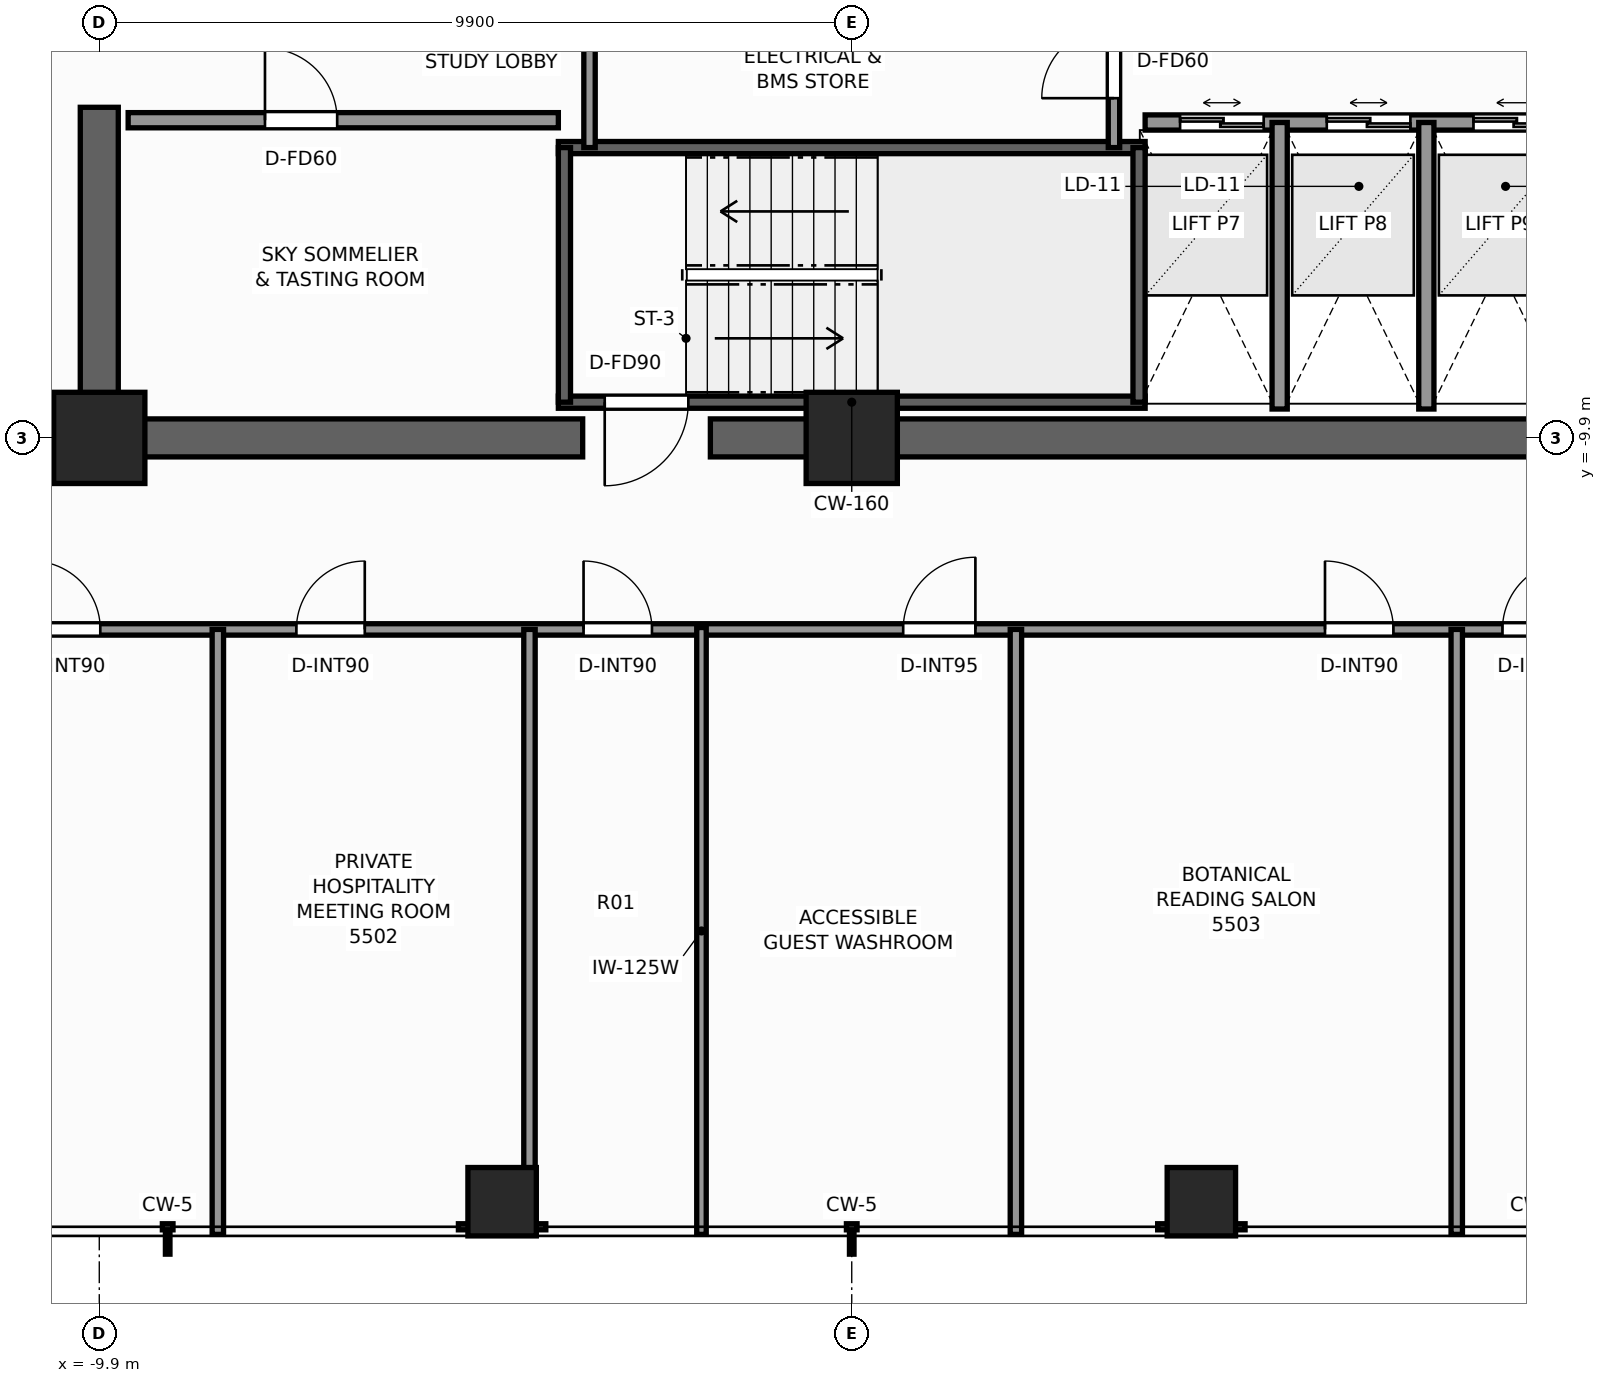
"""IFC4 building model, lengths in metres.
Left out: names, types, materials, properties, quantities, classifications, styles, units other than length and angle.
Written with IfcOpenShell. Run it as: python <this file> out.ifc"""

import sys

from ifc_helpers import new_model, si_unit, direction, frame, frame_2d, origin, origin_2d, place, context, subcontext, project, spatial, rectangle, extrude, element, fill, save


model = new_model("IFC4")
c1 = context("Model", 3, precision=1e-05, world=origin(), true_north=direction((0.0, 1.0)))
c2 = subcontext(c1, "Body", "Model", "MODEL_VIEW")
j1 = project(units=[si_unit("LENGTHUNIT", "METRE"), si_unit("PLANEANGLEUNIT", "RADIAN")], contexts=[c1])
p1 = place(None, origin())
s1 = spatial("IfcSite", under=j1, at=p1, CompositionType="ELEMENT")
p2 = place(p1, origin())
s2 = spatial("IfcBuilding", under=s1, at=p2, CompositionType="ELEMENT")
p3 = place(p2, frame((0.0, 0.0, 189.9)))
s3 = spatial("IfcBuildingStorey", under=s2, at=p3, CompositionType="ELEMENT", Elevation=189.9)
p4 = place(p3, frame((10.15, -9.9, 0.0), z_axis=(0.0, 0.0, 1.0), x_axis=(-1.0, 0.0, 0.0)))
e1 = element("IfcWall", 1, at=p4, inside=s3, PredefinedType="SHEAR", context=c2, shape_type="SweptSolid", body=[
    extrude(rectangle(XDim=12.01, YDim=0.5, at=frame_2d((6.005, 0.0))), origin(), (0.0, 0.0, 1.0), 3.3),
])
p5 = place(p3, frame((-3.54, -9.9, 0.0), z_axis=(0.0, 0.0, 1.0), x_axis=(-1.0, 0.0, 0.0)))
e2 = element("IfcWall", 2, at=p5, inside=s3, PredefinedType="SHEAR", context=c2, shape_type="SweptSolid", body=[
    extrude(rectangle(XDim=6.61, YDim=0.5, at=frame_2d((3.305, 0.0))), origin(), (0.0, 0.0, 1.0), 3.3),
])
p6 = place(p3, frame((-9.9, -9.65, 0.0), z_axis=(0.0, 0.0, 1.0), x_axis=(0.0, 1.0, 0.0)))
e3 = element("IfcWall", 3, at=p6, inside=s3, PredefinedType="SHEAR", context=c2, shape_type="SweptSolid", body=[
    extrude(rectangle(XDim=4.1, YDim=0.5, at=frame_2d((2.05, 0.0))), origin(), (0.0, 0.0, 1.0), 3.3),
])
for number, where, z_axis, x_axis in (
    (4, (-9.9, -9.9, 0.0), (0.0, 0.0, 1.0), (1.0, 0.0, 0.0)),
    (5, (0.0, -9.9, 0.0), (0.0, 0.0, 1.0), (1.0, 0.0, 0.0)),
):
    element("IfcColumn", number, at=place(p3, frame(where, z_axis=z_axis, x_axis=x_axis)), inside=s3, PredefinedType="COLUMN", context=c2, shape_type="SweptSolid", body=[
        extrude(rectangle(XDim=1.2, YDim=1.2, at=origin_2d()), origin(), (0.0, 0.0, 1.0), 3.3),
    ])
for number, where, z_axis, x_axis in (
    (6, (-4.6, -19.95, 0.0), (0.0, 0.0, 1.0), (1.0, 0.0, 0.0)),
    (7, (4.6, -19.95, 0.0), (0.0, 0.0, 1.0), (1.0, 0.0, 0.0)),
):
    element("IfcColumn", number, at=place(p3, frame(where, z_axis=z_axis, x_axis=x_axis)), inside=s3, PredefinedType="COLUMN", context=c2, shape_type="SweptSolid", body=[
        extrude(rectangle(XDim=0.9, YDim=0.9, at=origin_2d()), origin(), (0.0, 0.0, 1.0), 3.3),
    ])
p7 = place(p3, frame((3.86, -9.43, 0.0), z_axis=(0.0, 0.0, 1.0), x_axis=(-1.0, 0.0, 0.0)))
e8 = element("IfcWall", 8, at=p7, inside=s3, PredefinedType="SHEAR", context=c2, shape_type="SweptSolid", body=[
    extrude(rectangle(XDim=7.72, YDim=0.16, at=frame_2d((3.86, 0.0))), origin(), (0.0, 0.0, 1.0), 3.3),
])
p8 = place(p7, frame((6.01, 0.0, 0.0)))
e9 = element("IfcOpeningElement", 9, at=p8, cuts=e8, PredefinedType="OPENING", context=c2, shape_type="SweptSolid", body=[
    extrude(rectangle(XDim=1.1, YDim=2.2, at=frame_2d((0.55, 1.1))), frame((0.0, 0.09, 0.0), z_axis=(0.0, -1.0, 0.0), x_axis=(1.0, 0.0, 0.0)), (0.0, 0.0, 1.0), 0.18),
])
p9 = place(p3, frame((-3.86, -6.08, 0.0), z_axis=(0.0, 0.0, 1.0), x_axis=(1.0, 0.0, 0.0)))
e10 = element("IfcWall", 10, at=p9, inside=s3, PredefinedType="SHEAR", context=c2, shape_type="SweptSolid", body=[
    extrude(rectangle(XDim=7.72, YDim=0.16, at=frame_2d((3.86, 0.0))), origin(), (0.0, 0.0, 1.0), 3.3),
])
for number, where, z_axis, x_axis in (
    (11, (-3.78, -9.43, 0.0), (0.0, 0.0, 1.0), (0.0, 1.0, 0.0)),
    (12, (3.78, -9.43, 0.0), (0.0, 0.0, 1.0), (0.0, 1.0, 0.0)),
):
    element("IfcWall", number, at=place(p3, frame(where, z_axis=z_axis, x_axis=x_axis)), inside=s3, PredefinedType="SHEAR", context=c2, shape_type="SweptSolid", body=[
        extrude(rectangle(XDim=3.35, YDim=0.16, at=frame_2d((1.675, 0.0))), origin(), (0.0, 0.0, 1.0), 3.3),
    ])
p10 = place(p3, frame((-9.52, -5.72, 0.0), z_axis=(0.0, 0.0, 1.0), x_axis=(1.0, 0.0, 0.0)))
e13 = element("IfcWall", 13, at=p10, inside=s3, PredefinedType="SOLIDWALL", context=c2, shape_type="SweptSolid", body=[
    extrude(rectangle(XDim=5.66, YDim=0.2, at=frame_2d((2.83, 0.0))), origin(), (0.0, 0.0, 1.0), 3.08),
])
p11 = place(p10, frame((1.8, 0.0, 0.0)))
e14 = element("IfcOpeningElement", 14, at=p11, cuts=e13, PredefinedType="OPENING", context=c2, shape_type="SweptSolid", body=[
    extrude(rectangle(XDim=0.95, YDim=2.06, at=frame_2d((0.475, 1.03))), frame((0.0, 0.11, 0.0), z_axis=(0.0, -1.0, 0.0), x_axis=(1.0, 0.0, 0.0)), (0.0, 0.0, 1.0), 0.22),
])
p12 = place(p3, frame((3.86, -5.75, 0.0), z_axis=(0.0, 0.0, 1.0), x_axis=(1.0, 0.0, 0.0)))
e15 = element("IfcWall", 15, at=p12, inside=s3, PredefinedType="SOLIDWALL", context=c2, shape_type="SweptSolid", body=[
    extrude(rectangle(XDim=5.66, YDim=0.2, at=frame_2d((2.83, 0.0))), origin(), (0.0, 0.0, 1.0), 3.08),
])
p13 = place(p12, frame((0.46, 0.0, 0.0)))
e16 = element("IfcOpeningElement", 16, at=p13, cuts=e15, PredefinedType="OPENING", context=c2, shape_type="SweptSolid", body=[
    extrude(rectangle(XDim=1.1, YDim=2.2, at=frame_2d((0.55, 1.1))), frame((0.0, 0.11, 0.0), z_axis=(0.0, -1.0, 0.0), x_axis=(1.0, 0.0, 0.0)), (0.0, 0.0, 1.0), 0.22),
])
p14 = place(p12, frame((2.39, 0.0, 0.0)))
e17 = element("IfcOpeningElement", 17, at=p14, cuts=e15, PredefinedType="OPENING", context=c2, shape_type="SweptSolid", body=[
    extrude(rectangle(XDim=1.1, YDim=2.2, at=frame_2d((0.55, 1.1))), frame((0.0, 0.11, 0.0), z_axis=(0.0, -1.0, 0.0), x_axis=(1.0, 0.0, 0.0)), (0.0, 0.0, 1.0), 0.22),
])
p15 = place(p12, frame((4.32, 0.0, 0.0)))
e18 = element("IfcOpeningElement", 18, at=p15, cuts=e15, PredefinedType="OPENING", context=c2, shape_type="SweptSolid", body=[
    extrude(rectangle(XDim=1.1, YDim=2.2, at=frame_2d((0.55, 1.1))), frame((0.0, 0.11, 0.0), z_axis=(0.0, -1.0, 0.0), x_axis=(1.0, 0.0, 0.0)), (0.0, 0.0, 1.0), 0.22),
])
for number, where, z_axis, x_axis in (
    (19, (5.63, -9.52, 0.0), (0.0, 0.0, 1.0), (0.0, 1.0, 0.0)),
    (20, (7.56, -9.52, 0.0), (0.0, 0.0, 1.0), (0.0, 1.0, 0.0)),
):
    element("IfcWall", number, at=place(p3, frame(where, z_axis=z_axis, x_axis=x_axis)), inside=s3, PredefinedType="SOLIDWALL", context=c2, shape_type="SweptSolid", body=[
        extrude(rectangle(XDim=3.77, YDim=0.2, at=frame_2d((1.885, 0.0))), origin(), (0.0, 0.0, 1.0), 3.08),
    ])
p16 = place(p3, frame((3.45, -6.08, 0.0), z_axis=(0.0, 0.0, 1.0), x_axis=(0.0, 1.0, 0.0)))
e21 = element("IfcWall", 21, at=p16, inside=s3, PredefinedType="PARTITIONING", context=c2, shape_type="SweptSolid", body=[
    extrude(rectangle(XDim=2.36, YDim=0.15, at=frame_2d((1.18, 0.0))), origin(), (0.0, 0.0, 1.0), 3.08),
])
p17 = place(p16, frame((0.65, 0.0, 0.0)))
e22 = element("IfcOpeningElement", 22, at=p17, cuts=e21, PredefinedType="OPENING", context=c2, shape_type="SweptSolid", body=[
    extrude(rectangle(XDim=0.95, YDim=2.06, at=frame_2d((0.475, 1.03))), frame((0.0, 0.085, 0.0), z_axis=(0.0, -1.0, 0.0), x_axis=(1.0, 0.0, 0.0)), (0.0, 0.0, 1.0), 0.17),
])
p18 = place(p3, frame((-3.45, -6.08, 0.0), z_axis=(0.0, 0.0, 1.0), x_axis=(0.0, 1.0, 0.0)))
e23 = element("IfcWall", 23, at=p18, inside=s3, PredefinedType="PARTITIONING", context=c2, shape_type="SweptSolid", body=[
    extrude(rectangle(XDim=2.36, YDim=0.15, at=frame_2d((1.18, 0.0))), origin(), (0.0, 0.0, 1.0), 3.08),
])
p19 = place(p3, frame((-12.42, -12.42, 0.0), z_axis=(0.0, 0.0, 1.0), x_axis=(1.0, 0.0, 0.0)))
e24 = element("IfcWall", 24, at=p19, inside=s3, PredefinedType="PARTITIONING", context=c2, shape_type="SweptSolid", body=[
    extrude(rectangle(XDim=25.0, YDim=0.15, at=frame_2d((12.5, 0.0))), origin(), (0.0, 0.0, 1.0), 2.369),
])
p20 = place(p19, frame((1.633, 0.0, 0.0)))
e25 = element("IfcOpeningElement", 25, at=p20, cuts=e24, PredefinedType="OPENING", context=c2, shape_type="SweptSolid", body=[
    extrude(rectangle(XDim=0.9, YDim=2.06, at=frame_2d((0.45, 1.03))), frame((0.0, 0.085, 0.0), z_axis=(0.0, -1.0, 0.0), x_axis=(1.0, 0.0, 0.0)), (0.0, 0.0, 1.0), 0.17),
])
p21 = place(p19, frame((5.113, 0.0, 0.0)))
e26 = element("IfcOpeningElement", 26, at=p21, cuts=e24, PredefinedType="OPENING", context=c2, shape_type="SweptSolid", body=[
    extrude(rectangle(XDim=0.9, YDim=2.06, at=frame_2d((0.45, 1.03))), frame((0.0, 0.085, 0.0), z_axis=(0.0, -1.0, 0.0), x_axis=(1.0, 0.0, 0.0)), (0.0, 0.0, 1.0), 0.17),
])
p22 = place(p19, frame((8.892, 0.0, 0.0)))
e27 = element("IfcOpeningElement", 27, at=p22, cuts=e24, PredefinedType="OPENING", context=c2, shape_type="SweptSolid", body=[
    extrude(rectangle(XDim=0.9, YDim=2.06, at=frame_2d((0.45, 1.03))), frame((0.0, 0.085, 0.0), z_axis=(0.0, -1.0, 0.0), x_axis=(1.0, 0.0, 0.0)), (0.0, 0.0, 1.0), 0.17),
])
p23 = place(p19, frame((13.097, 0.0, 0.0)))
e28 = element("IfcOpeningElement", 28, at=p23, cuts=e24, PredefinedType="OPENING", context=c2, shape_type="SweptSolid", body=[
    extrude(rectangle(XDim=0.95, YDim=2.06, at=frame_2d((0.475, 1.03))), frame((0.0, 0.085, 0.0), z_axis=(0.0, -1.0, 0.0), x_axis=(1.0, 0.0, 0.0)), (0.0, 0.0, 1.0), 0.17),
])
p24 = place(p19, frame((18.646, 0.0, 0.0)))
e29 = element("IfcOpeningElement", 29, at=p24, cuts=e24, PredefinedType="OPENING", context=c2, shape_type="SweptSolid", body=[
    extrude(rectangle(XDim=0.9, YDim=2.06, at=frame_2d((0.45, 1.03))), frame((0.0, 0.085, 0.0), z_axis=(0.0, -1.0, 0.0), x_axis=(1.0, 0.0, 0.0)), (0.0, 0.0, 1.0), 0.17),
])
p25 = place(p19, frame((20.981, 0.0, 0.0)))
e30 = element("IfcOpeningElement", 30, at=p25, cuts=e24, PredefinedType="OPENING", context=c2, shape_type="SweptSolid", body=[
    extrude(rectangle(XDim=0.9, YDim=2.06, at=frame_2d((0.45, 1.03))), frame((0.0, 0.085, 0.0), z_axis=(0.0, -1.0, 0.0), x_axis=(1.0, 0.0, 0.0)), (0.0, 0.0, 1.0), 0.17),
])
for number, where, z_axis, x_axis in (
    (31, (-8.34, -20.38, 0.0), (0.0, 0.0, 1.0), (0.0, 1.0, 0.0)),
    (32, (-4.24, -20.38, 0.0), (0.0, 0.0, 1.0), (0.0, 1.0, 0.0)),
    (33, (2.16, -20.38, 0.0), (0.0, 0.0, 1.0), (0.0, 1.0, 0.0)),
):
    element("IfcWall", number, at=place(p3, frame(where, z_axis=z_axis, x_axis=x_axis)), inside=s3, PredefinedType="PARTITIONING", context=c2, shape_type="SweptSolid", body=[
        extrude(rectangle(XDim=7.96, YDim=0.15, at=frame_2d((3.98, 0.0))), origin(), (0.0, 0.0, 1.0), 2.453),
    ])
p26 = place(p3, frame((-1.977, -20.38, 0.0), z_axis=(0.0, 0.0, 1.0), x_axis=(0.0, 1.0, 0.0)))
e34 = element("IfcWall", 34, at=p26, inside=s3, PredefinedType="PARTITIONING", context=c2, shape_type="SweptSolid", body=[
    extrude(rectangle(XDim=7.985, YDim=0.125, at=frame_2d((3.992, 0.0))), origin(), (0.0, 0.0, 1.0), 2.453),
])
p27 = place(p3, frame((7.96, -20.38, 0.0), z_axis=(0.0, 0.0, 1.0), x_axis=(0.0, 1.0, 0.0)))
e35 = element("IfcWall", 35, at=p27, inside=s3, PredefinedType="PARTITIONING", context=c2, shape_type="SweptSolid", body=[
    extrude(rectangle(XDim=7.96, YDim=0.15, at=frame_2d((3.98, 0.0))), origin(), (0.0, 0.0, 1.0), 2.453),
])
p28 = place(p8, origin())
e36 = element("IfcDoor", 36, at=p28, inside=s3, OperationType="SINGLE_SWING_RIGHT", PredefinedType="DOOR", context=c2, shape_type="SweptSolid", body=[
    extrude(rectangle(XDim=1.1, YDim=2.2, at=frame_2d((0.55, 1.1))), frame((0.0, 0.025, 0.0), z_axis=(0.0, -1.0, 0.0), x_axis=(1.0, 0.0, 0.0)), (0.0, 0.0, 1.0), 0.05),
])
fill(e9, e36)
p29 = place(p11, origin())
e37 = element("IfcDoor", 37, at=p29, inside=s3, OperationType="SINGLE_SWING_LEFT", PredefinedType="DOOR", context=c2, shape_type="SweptSolid", body=[
    extrude(rectangle(XDim=0.95, YDim=2.06, at=frame_2d((0.475, 1.03))), frame((0.0, 0.025, 0.0), z_axis=(0.0, -1.0, 0.0), x_axis=(1.0, 0.0, 0.0)), (0.0, 0.0, 1.0), 0.05),
])
fill(e14, e37)
p30 = place(p13, origin())
e38 = element("IfcDoor", 38, at=p30, inside=s3, OperationType="DOUBLE_DOOR_SLIDING", PredefinedType="DOOR", context=c2, shape_type="SweptSolid", body=[
    extrude(rectangle(XDim=1.1, YDim=2.2, at=frame_2d((0.55, 1.1))), frame((0.0, 0.025, 0.0), z_axis=(0.0, -1.0, 0.0), x_axis=(1.0, 0.0, 0.0)), (0.0, 0.0, 1.0), 0.05),
])
fill(e16, e38)
p31 = place(p14, origin())
e39 = element("IfcDoor", 39, at=p31, inside=s3, OperationType="DOUBLE_DOOR_SLIDING", PredefinedType="DOOR", context=c2, shape_type="SweptSolid", body=[
    extrude(rectangle(XDim=1.1, YDim=2.2, at=frame_2d((0.55, 1.1))), frame((0.0, 0.025, 0.0), z_axis=(0.0, -1.0, 0.0), x_axis=(1.0, 0.0, 0.0)), (0.0, 0.0, 1.0), 0.05),
])
fill(e17, e39)
p32 = place(p15, origin())
e40 = element("IfcDoor", 40, at=p32, inside=s3, OperationType="DOUBLE_DOOR_SLIDING", PredefinedType="DOOR", context=c2, shape_type="SweptSolid", body=[
    extrude(rectangle(XDim=1.1, YDim=2.2, at=frame_2d((0.55, 1.1))), frame((0.0, 0.025, 0.0), z_axis=(0.0, -1.0, 0.0), x_axis=(1.0, 0.0, 0.0)), (0.0, 0.0, 1.0), 0.05),
])
fill(e18, e40)
p33 = place(p17, origin())
e41 = element("IfcDoor", 41, at=p33, inside=s3, OperationType="SINGLE_SWING_LEFT", PredefinedType="DOOR", context=c2, shape_type="SweptSolid", body=[
    extrude(rectangle(XDim=0.95, YDim=2.06, at=frame_2d((0.475, 1.03))), frame((0.0, 0.025, 0.0), z_axis=(0.0, -1.0, 0.0), x_axis=(1.0, 0.0, 0.0)), (0.0, 0.0, 1.0), 0.05),
])
fill(e22, e41)
p34 = place(p20, origin())
e42 = element("IfcDoor", 42, at=p34, inside=s3, OperationType="SINGLE_SWING_LEFT", PredefinedType="DOOR", context=c2, shape_type="SweptSolid", body=[
    extrude(rectangle(XDim=0.9, YDim=2.06, at=frame_2d((0.45, 1.03))), frame((0.0, 0.025, 0.0), z_axis=(0.0, -1.0, 0.0), x_axis=(1.0, 0.0, 0.0)), (0.0, 0.0, 1.0), 0.05),
])
fill(e25, e42)
p35 = place(p21, origin())
e43 = element("IfcDoor", 43, at=p35, inside=s3, OperationType="SINGLE_SWING_RIGHT", PredefinedType="DOOR", context=c2, shape_type="SweptSolid", body=[
    extrude(rectangle(XDim=0.9, YDim=2.06, at=frame_2d((0.45, 1.03))), frame((0.0, 0.025, 0.0), z_axis=(0.0, -1.0, 0.0), x_axis=(1.0, 0.0, 0.0)), (0.0, 0.0, 1.0), 0.05),
])
fill(e26, e43)
p36 = place(p22, origin())
e44 = element("IfcDoor", 44, at=p36, inside=s3, OperationType="SINGLE_SWING_LEFT", PredefinedType="DOOR", context=c2, shape_type="SweptSolid", body=[
    extrude(rectangle(XDim=0.9, YDim=2.06, at=frame_2d((0.45, 1.03))), frame((0.0, 0.025, 0.0), z_axis=(0.0, -1.0, 0.0), x_axis=(1.0, 0.0, 0.0)), (0.0, 0.0, 1.0), 0.05),
])
fill(e27, e44)
p37 = place(p23, origin())
e45 = element("IfcDoor", 45, at=p37, inside=s3, OperationType="SINGLE_SWING_RIGHT", PredefinedType="DOOR", context=c2, shape_type="SweptSolid", body=[
    extrude(rectangle(XDim=0.95, YDim=2.06, at=frame_2d((0.475, 1.03))), frame((0.0, 0.025, 0.0), z_axis=(0.0, -1.0, 0.0), x_axis=(1.0, 0.0, 0.0)), (0.0, 0.0, 1.0), 0.05),
])
fill(e28, e45)
p38 = place(p24, origin())
e46 = element("IfcDoor", 46, at=p38, inside=s3, OperationType="SINGLE_SWING_LEFT", PredefinedType="DOOR", context=c2, shape_type="SweptSolid", body=[
    extrude(rectangle(XDim=0.9, YDim=2.06, at=frame_2d((0.45, 1.03))), frame((0.0, 0.025, 0.0), z_axis=(0.0, -1.0, 0.0), x_axis=(1.0, 0.0, 0.0)), (0.0, 0.0, 1.0), 0.05),
])
fill(e29, e46)
p39 = place(p25, origin())
e47 = element("IfcDoor", 47, at=p39, inside=s3, OperationType="SINGLE_SWING_RIGHT", PredefinedType="DOOR", context=c2, shape_type="SweptSolid", body=[
    extrude(rectangle(XDim=0.9, YDim=2.06, at=frame_2d((0.45, 1.03))), frame((0.0, 0.025, 0.0), z_axis=(0.0, -1.0, 0.0), x_axis=(1.0, 0.0, 0.0)), (0.0, 0.0, 1.0), 0.05),
])
fill(e30, e47)
save(model, sys.argv[1])
